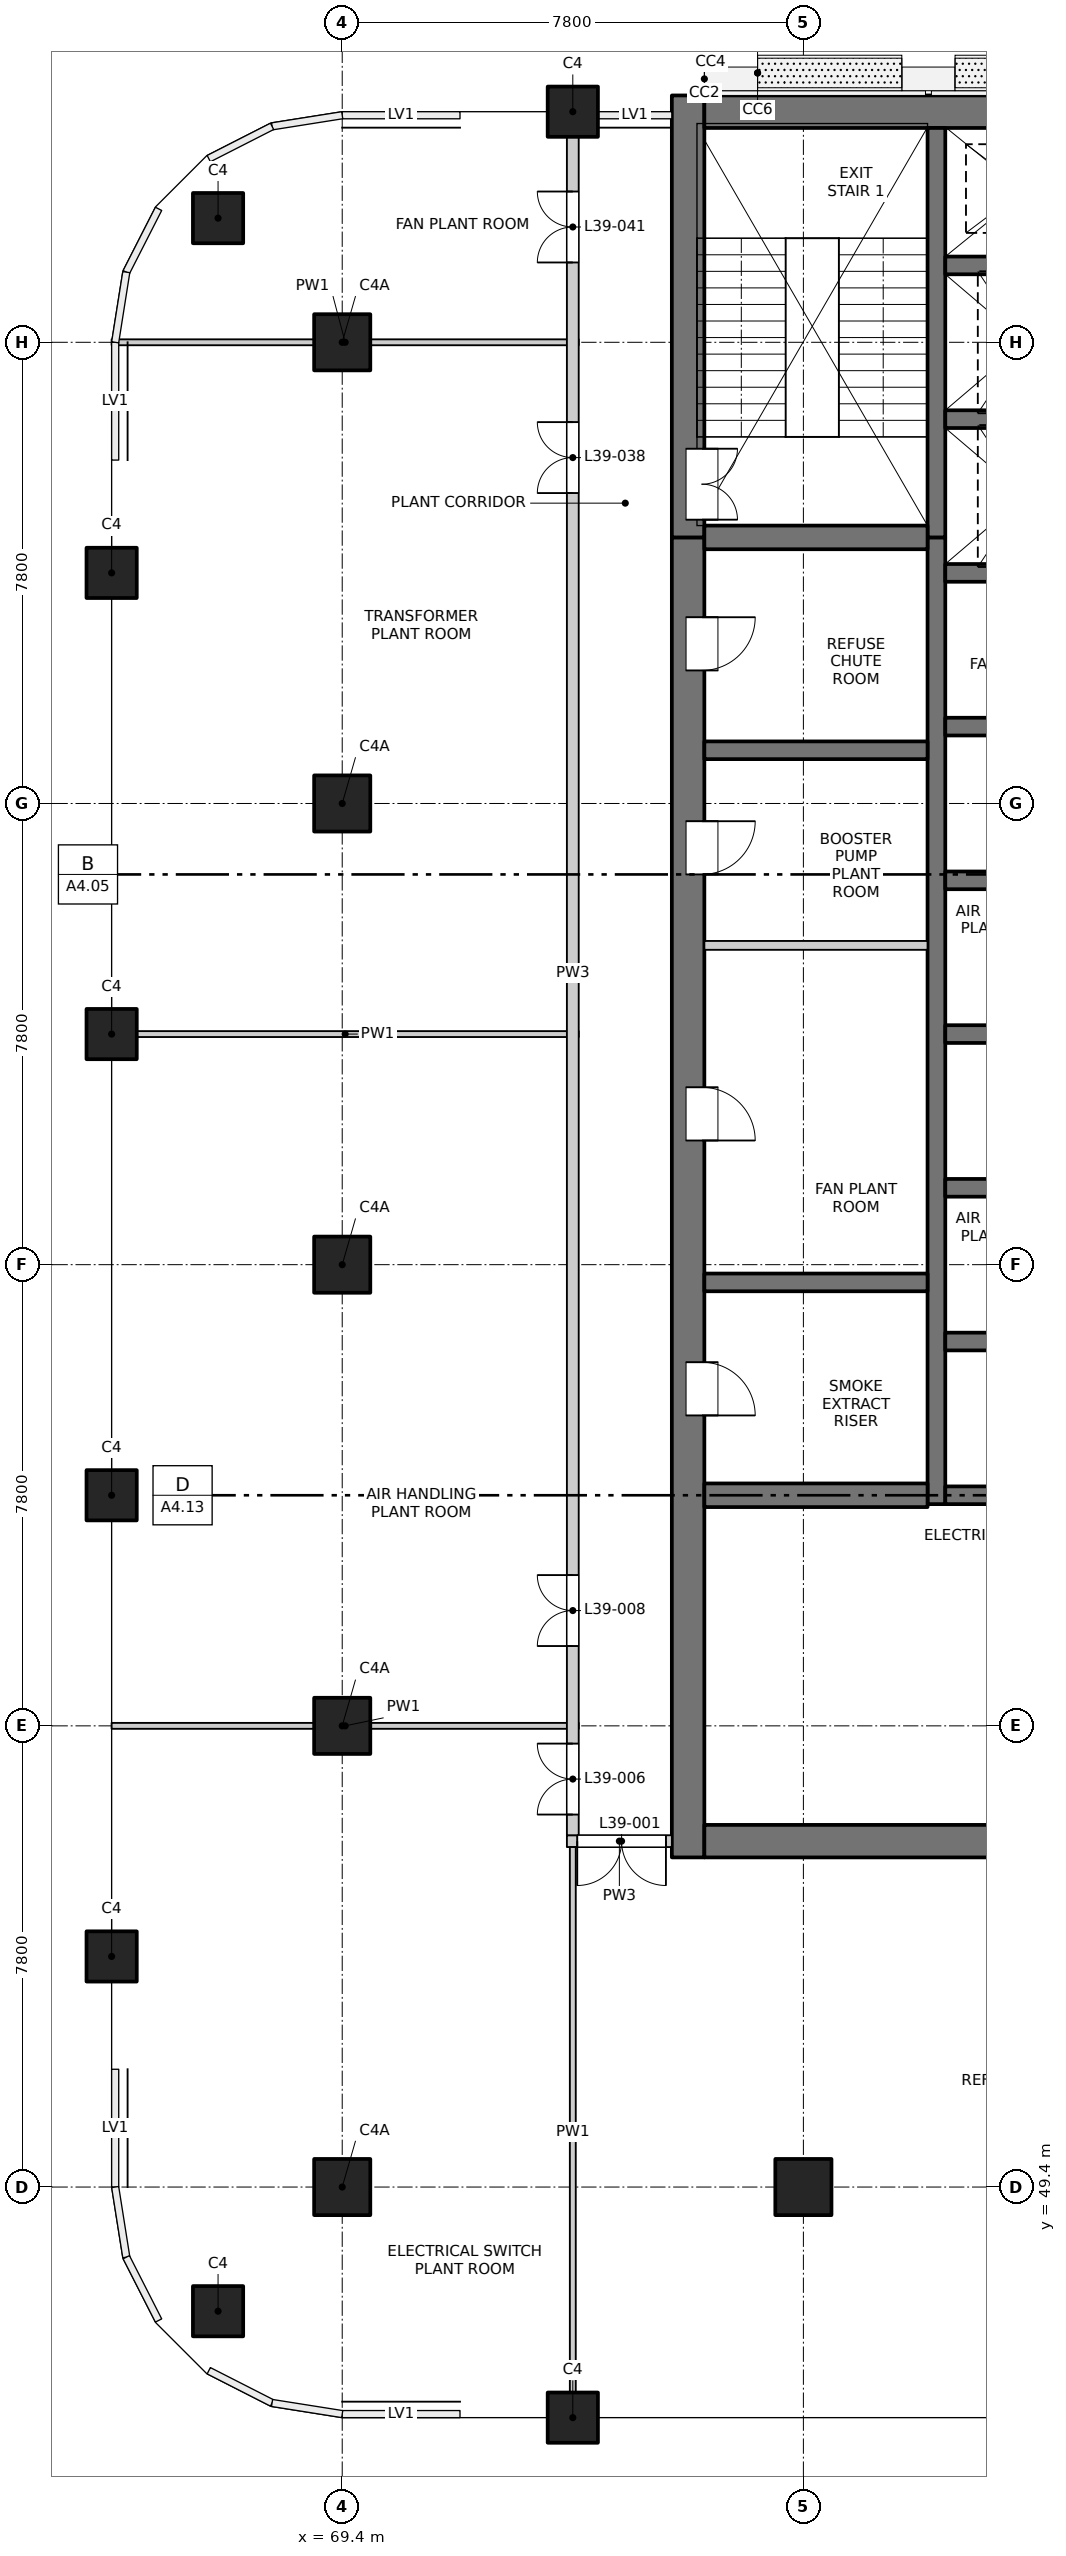
"""IFC4 building model, lengths in metres.
Left out: names, types, materials, properties, quantities, classifications, styles, units other than length and angle.
Written with IfcOpenShell. Run it as: python <this file> out.ifc"""

import sys

from ifc_helpers import new_model, si_unit, direction, frame, frame_2d, origin, origin_2d, place, context, subcontext, project, spatial, rectangle, extrude, element, fill, save


model = new_model("IFC4")
c1 = context("Model", 3, precision=1e-05, world=origin(), true_north=direction((0.0, 1.0)))
c2 = subcontext(c1, "Body", "Model", "MODEL_VIEW")
j1 = project(units=[si_unit("LENGTHUNIT", "METRE"), si_unit("PLANEANGLEUNIT", "RADIAN")], contexts=[c1])
p1 = place(None, origin())
s1 = spatial("IfcSite", under=j1, at=p1, CompositionType="ELEMENT")
p2 = place(p1, origin())
s2 = spatial("IfcBuilding", under=s1, at=p2, CompositionType="ELEMENT")
p3 = place(p2, frame((0.0, 0.0, 144.1)))
s3 = spatial("IfcBuildingStorey", under=s2, at=p3, CompositionType="ELEMENT", Elevation=144.1)
for number, where, z_axis, x_axis in (
    (1, (67.3, 47.3, -0.3), (0.0, 0.0, 1.0), (1.0, 0.0, 0.0)),
    (2, (67.3, 82.7, -0.3), (0.0, 0.0, 1.0), (1.0, 0.0, 0.0)),
    (3, (65.5, 53.3, -0.3), (0.0, 0.0, 1.0), (1.0, 0.0, 0.0)),
    (4, (73.3, 45.5, -0.3), (0.0, 0.0, 1.0), (1.0, 0.0, 0.0)),
    (5, (73.3, 84.5, -0.3), (0.0, 0.0, 1.0), (1.0, 0.0, 0.0)),
    (6, (65.5, 61.1, -0.3), (0.0, 0.0, 1.0), (1.0, 0.0, 0.0)),
    (7, (65.5, 68.9, -0.3), (0.0, 0.0, 1.0), (1.0, 0.0, 0.0)),
    (8, (65.5, 76.7, -0.3), (0.0, 0.0, 1.0), (1.0, 0.0, 0.0)),
):
    element("IfcColumn", number, at=place(p3, frame(where, z_axis=z_axis, x_axis=x_axis)), inside=s3, PredefinedType="COLUMN", context=c2, shape_type="SweptSolid", body=[
        extrude(rectangle(XDim=0.85, YDim=0.85, at=origin_2d()), origin(), (0.0, 0.0, 1.0), 4.5),
    ])
for number, where, z_axis, x_axis in (
    (9, (69.4, 49.4, -0.3), (0.0, 0.0, 1.0), (1.0, 0.0, 0.0)),
    (10, (69.4, 57.2, -0.3), (0.0, 0.0, 1.0), (1.0, 0.0, 0.0)),
    (11, (69.4, 65.0, -0.3), (0.0, 0.0, 1.0), (1.0, 0.0, 0.0)),
    (12, (69.4, 72.8, -0.3), (0.0, 0.0, 1.0), (1.0, 0.0, 0.0)),
    (13, (69.4, 80.6, -0.3), (0.0, 0.0, 1.0), (1.0, 0.0, 0.0)),
    (14, (77.2, 49.4, -0.3), (0.0, 0.0, 1.0), (1.0, 0.0, 0.0)),
):
    element("IfcColumn", number, at=place(p3, frame(where, z_axis=z_axis, x_axis=x_axis)), inside=s3, PredefinedType="COLUMN", context=c2, shape_type="SweptSolid", body=[
        extrude(rectangle(XDim=0.95, YDim=0.95, at=origin_2d()), origin(), (0.0, 0.0, 1.0), 4.5),
    ])
p4 = place(p3, frame((75.25, 54.975, -0.3), z_axis=(0.0, 0.0, 1.0), x_axis=(0.0, 1.0, 0.0)))
e15 = element("IfcWall", 15, at=p4, inside=s3, PredefinedType="SOLIDWALL", context=c2, shape_type="SweptSolid", body=[
    extrude(rectangle(XDim=22.325, YDim=0.55, at=frame_2d((11.163, 0.0))), origin(), (0.0, 0.0, 1.0), 4.5),
])
p5 = place(p4, frame((7.475, 0.0, 0.3)))
e16 = element("IfcOpeningElement", 16, at=p5, cuts=e15, PredefinedType="OPENING", context=c2, shape_type="SweptSolid", body=[
    extrude(rectangle(XDim=0.9, YDim=2.1, at=frame_2d((0.45, 1.05))), frame((0.0, 0.285, 0.0), z_axis=(0.0, -1.0, 0.0), x_axis=(1.0, 0.0, 0.0)), (0.0, 0.0, 1.0), 0.57),
])
p6 = place(p4, frame((12.125, 0.0, 0.3)))
e17 = element("IfcOpeningElement", 17, at=p6, cuts=e15, PredefinedType="OPENING", context=c2, shape_type="SweptSolid", body=[
    extrude(rectangle(XDim=0.9, YDim=2.1, at=frame_2d((0.45, 1.05))), frame((0.0, 0.285, 0.0), z_axis=(0.0, -1.0, 0.0), x_axis=(1.0, 0.0, 0.0)), (0.0, 0.0, 1.0), 0.57),
])
p7 = place(p4, frame((16.625, 0.0, 0.3)))
e18 = element("IfcOpeningElement", 18, at=p7, cuts=e15, PredefinedType="OPENING", context=c2, shape_type="SweptSolid", body=[
    extrude(rectangle(XDim=0.9, YDim=2.1, at=frame_2d((0.45, 1.05))), frame((0.0, 0.285, 0.0), z_axis=(0.0, -1.0, 0.0), x_axis=(1.0, 0.0, 0.0)), (0.0, 0.0, 1.0), 0.57),
])
p8 = place(p4, frame((20.075, 0.0, 0.3)))
e19 = element("IfcOpeningElement", 19, at=p8, cuts=e15, PredefinedType="OPENING", context=c2, shape_type="SweptSolid", body=[
    extrude(rectangle(XDim=0.9, YDim=2.1, at=frame_2d((0.45, 1.05))), frame((0.0, 0.285, 0.0), z_axis=(0.0, -1.0, 0.0), x_axis=(1.0, 0.0, 0.0)), (0.0, 0.0, 1.0), 0.57),
])
p9 = place(p3, frame((75.25, 77.3, -0.3), z_axis=(0.0, 0.0, 1.0), x_axis=(0.0, 1.0, 0.0)))
e20 = element("IfcWall", 20, at=p9, inside=s3, PredefinedType="SOLIDWALL", context=c2, shape_type="SweptSolid", body=[
    extrude(rectangle(XDim=7.475, YDim=0.55, at=frame_2d((3.737, 0.0))), origin(), (0.0, 0.0, 1.0), 4.5),
])
p10 = place(p9, frame((0.3, 0.0, 0.3)))
e21 = element("IfcOpeningElement", 21, at=p10, cuts=e20, PredefinedType="OPENING", context=c2, shape_type="SweptSolid", body=[
    extrude(rectangle(XDim=1.2, YDim=2.1, at=frame_2d((0.6, 1.05))), frame((0.0, 0.285, 0.0), z_axis=(0.0, -1.0, 0.0), x_axis=(1.0, 0.0, 0.0)), (0.0, 0.0, 1.0), 0.57),
])
p11 = place(p3, frame((75.525, 55.25, -0.3), z_axis=(0.0, 0.0, 1.0), x_axis=(1.0, 0.0, 0.0)))
e22 = element("IfcWall", 22, at=p11, inside=s3, PredefinedType="SOLIDWALL", context=c2, shape_type="SweptSolid", body=[
    extrude(rectangle(XDim=18.95, YDim=0.55, at=frame_2d((9.475, 0.0))), origin(), (0.0, 0.0, 1.0), 4.5),
])
p12 = place(p11, frame((7.225, 0.0, 0.3)))
e23 = element("IfcOpeningElement", 23, at=p12, cuts=e22, PredefinedType="OPENING", context=c2, shape_type="SweptSolid", body=[
    extrude(rectangle(XDim=1.5, YDim=2.1, at=frame_2d((0.75, 1.05))), frame((0.0, 0.285, 0.0), z_axis=(0.0, -1.0, 0.0), x_axis=(1.0, 0.0, 0.0)), (0.0, 0.0, 1.0), 0.57),
])
p13 = place(p3, frame((75.525, 84.5, -0.3), z_axis=(0.0, 0.0, 1.0), x_axis=(1.0, 0.0, 0.0)))
e24 = element("IfcWall", 24, at=p13, inside=s3, PredefinedType="SOLIDWALL", context=c2, shape_type="SweptSolid", body=[
    extrude(rectangle(XDim=18.95, YDim=0.55, at=frame_2d((9.475, 0.0))), origin(), (0.0, 0.0, 1.0), 4.5),
])
p14 = place(p3, frame((79.45, 60.95, -0.3), z_axis=(0.0, 0.0, 1.0), x_axis=(0.0, 1.0, 0.0)))
e25 = element("IfcWall", 25, at=p14, inside=s3, PredefinedType="SOLIDWALL", context=c2, shape_type="SweptSolid", body=[
    extrude(rectangle(XDim=16.35, YDim=0.3, at=frame_2d((8.175, 0.0))), origin(), (0.0, 0.0, 1.0), 4.5),
])
p15 = place(p3, frame((79.45, 77.3, -0.3), z_axis=(0.0, 0.0, 1.0), x_axis=(0.0, 1.0, 0.0)))
e26 = element("IfcWall", 26, at=p15, inside=s3, PredefinedType="SOLIDWALL", context=c2, shape_type="SweptSolid", body=[
    extrude(rectangle(XDim=6.925, YDim=0.3, at=frame_2d((3.462, 0.0))), origin(), (0.0, 0.0, 1.0), 4.5),
])
for number, where, z_axis, x_axis in (
    (27, (79.6, 61.1, -0.3), (0.0, 0.0, 1.0), (1.0, 0.0, 0.0)),
    (28, (79.6, 63.7, -0.3), (0.0, 0.0, 1.0), (1.0, 0.0, 0.0)),
    (29, (79.6, 66.3, -0.3), (0.0, 0.0, 1.0), (1.0, 0.0, 0.0)),
    (30, (79.6, 68.9, -0.3), (0.0, 0.0, 1.0), (1.0, 0.0, 0.0)),
    (31, (79.6, 71.5, -0.3), (0.0, 0.0, 1.0), (1.0, 0.0, 0.0)),
    (32, (79.6, 74.1, -0.3), (0.0, 0.0, 1.0), (1.0, 0.0, 0.0)),
    (33, (79.6, 76.7, -0.3), (0.0, 0.0, 1.0), (1.0, 0.0, 0.0)),
    (34, (79.6, 79.3, -0.3), (0.0, 0.0, 1.0), (1.0, 0.0, 0.0)),
    (35, (79.6, 81.9, -0.3), (0.0, 0.0, 1.0), (1.0, 0.0, 0.0)),
):
    element("IfcWall", number, at=place(p3, frame(where, z_axis=z_axis, x_axis=x_axis)), inside=s3, PredefinedType="SOLIDWALL", context=c2, shape_type="SweptSolid", body=[
        extrude(rectangle(XDim=3.0, YDim=0.3, at=frame_2d((1.5, 0.0))), origin(), (0.0, 0.0, 1.0), 4.5),
    ])
p16 = place(p3, frame((75.525, 61.1, -0.3), z_axis=(0.0, 0.0, 1.0), x_axis=(1.0, 0.0, 0.0)))
e36 = element("IfcWall", 36, at=p16, inside=s3, PredefinedType="SOLIDWALL", context=c2, shape_type="SweptSolid", body=[
    extrude(rectangle(XDim=3.775, YDim=0.4, at=frame_2d((1.888, 0.0))), origin(), (0.0, 0.0, 1.0), 4.5),
])
for number, where, z_axis, x_axis in (
    (37, (75.525, 64.7, -0.3), (0.0, 0.0, 1.0), (1.0, 0.0, 0.0)),
    (38, (75.525, 73.7, -0.3), (0.0, 0.0, 1.0), (1.0, 0.0, 0.0)),
):
    element("IfcWall", number, at=place(p3, frame(where, z_axis=z_axis, x_axis=x_axis)), inside=s3, PredefinedType="SOLIDWALL", context=c2, shape_type="SweptSolid", body=[
        extrude(rectangle(XDim=3.775, YDim=0.3, at=frame_2d((1.888, 0.0))), origin(), (0.0, 0.0, 1.0), 4.5),
    ])
p17 = place(p3, frame((75.525, 77.3, -0.3), z_axis=(0.0, 0.0, 1.0), x_axis=(1.0, 0.0, 0.0)))
e39 = element("IfcWall", 39, at=p17, inside=s3, PredefinedType="SOLIDWALL", context=c2, shape_type="SweptSolid", body=[
    extrude(rectangle(XDim=3.775, YDim=0.4, at=frame_2d((1.888, 0.0))), origin(), (0.0, 0.0, 1.0), 4.5),
])
p18 = place(p3, frame((73.2, 55.25, 0.0), z_axis=(0.0, 0.0, 1.0), x_axis=(1.0, 0.0, 0.0)))
e40 = element("IfcWall", 40, at=p18, inside=s3, PredefinedType="PARTITIONING", context=c2, shape_type="SweptSolid", body=[
    extrude(rectangle(XDim=1.775, YDim=0.2, at=frame_2d((0.887, 0.0))), origin(), (0.0, 0.0, 1.0), 4.2),
])
p19 = place(p18, frame((0.175, 0.0, 0.0)))
e41 = element("IfcOpeningElement", 41, at=p19, cuts=e40, PredefinedType="OPENING", context=c2, shape_type="SweptSolid", body=[
    extrude(rectangle(XDim=1.5, YDim=2.1, at=frame_2d((0.75, 1.05))), frame((0.0, 0.11, 0.0), z_axis=(0.0, -1.0, 0.0), x_axis=(1.0, 0.0, 0.0)), (0.0, 0.0, 1.0), 0.22),
])
p20 = place(p3, frame((65.5, 57.2, 0.0), z_axis=(0.0, 0.0, 1.0), x_axis=(1.0, 0.0, 0.0)))
e42 = element("IfcWall", 42, at=p20, inside=s3, PredefinedType="PARTITIONING", context=c2, shape_type="SweptSolid", body=[
    extrude(rectangle(XDim=7.9, YDim=0.1, at=frame_2d((3.95, 0.0))), origin(), (0.0, 0.0, 1.0), 4.2),
])
p21 = place(p3, frame((65.5, 68.9, 0.0), z_axis=(0.0, 0.0, 1.0), x_axis=(1.0, 0.0, 0.0)))
e43 = element("IfcWall", 43, at=p21, inside=s3, PredefinedType="PARTITIONING", context=c2, shape_type="SweptSolid", body=[
    extrude(rectangle(XDim=7.9, YDim=0.1, at=frame_2d((3.95, 0.0))), origin(), (0.0, 0.0, 1.0), 3.6),
])
p22 = place(p3, frame((75.525, 70.4, 0.0), z_axis=(0.0, 0.0, 1.0), x_axis=(1.0, 0.0, 0.0)))
e44 = element("IfcWall", 44, at=p22, inside=s3, PredefinedType="PARTITIONING", context=c2, shape_type="SweptSolid", body=[
    extrude(rectangle(XDim=3.775, YDim=0.15, at=frame_2d((1.887, 0.0))), origin(), (0.0, 0.0, 1.0), 4.2),
])
p23 = place(p3, frame((65.5, 80.6, 0.0), z_axis=(0.0, 0.0, 1.0), x_axis=(1.0, 0.0, 0.0)))
e45 = element("IfcWall", 45, at=p23, inside=s3, PredefinedType="PARTITIONING", context=c2, shape_type="SweptSolid", body=[
    extrude(rectangle(XDim=7.9, YDim=0.1, at=frame_2d((3.95, 0.0))), origin(), (0.0, 0.0, 1.0), 4.2),
])
p24 = place(p3, frame((73.3, 45.5, 0.0), z_axis=(0.0, 0.0, 1.0), x_axis=(0.0, 1.0, 0.0)))
e46 = element("IfcWall", 46, at=p24, inside=s3, PredefinedType="PARTITIONING", context=c2, shape_type="SweptSolid", body=[
    extrude(rectangle(XDim=9.65, YDim=0.1, at=frame_2d((4.825, 0.0))), origin(), (0.0, 0.0, 1.0), 4.2),
])
p25 = place(p3, frame((73.3, 55.35, 0.0), z_axis=(0.0, 0.0, 1.0), x_axis=(0.0, 1.0, 0.0)))
e47 = element("IfcWall", 47, at=p25, inside=s3, PredefinedType="PARTITIONING", context=c2, shape_type="SweptSolid", body=[
    extrude(rectangle(XDim=29.15, YDim=0.2, at=frame_2d((14.575, 0.0))), origin(), (0.0, 0.0, 1.0), 4.2),
])
p26 = place(p25, frame((0.35, 0.0, 0.0)))
e48 = element("IfcOpeningElement", 48, at=p26, cuts=e47, PredefinedType="OPENING", context=c2, shape_type="SweptSolid", body=[
    extrude(rectangle(XDim=1.2, YDim=2.1, at=frame_2d((0.6, 1.05))), frame((0.0, 0.11, 0.0), z_axis=(0.0, -1.0, 0.0), x_axis=(1.0, 0.0, 0.0)), (0.0, 0.0, 1.0), 0.22),
])
p27 = place(p25, frame((3.2, 0.0, 0.0)))
e49 = element("IfcOpeningElement", 49, at=p27, cuts=e47, PredefinedType="OPENING", context=c2, shape_type="SweptSolid", body=[
    extrude(rectangle(XDim=1.2, YDim=2.1, at=frame_2d((0.6, 1.05))), frame((0.0, 0.11, 0.0), z_axis=(0.0, -1.0, 0.0), x_axis=(1.0, 0.0, 0.0)), (0.0, 0.0, 1.0), 0.22),
])
p28 = place(p25, frame((22.7, 0.0, 0.0)))
e50 = element("IfcOpeningElement", 50, at=p28, cuts=e47, PredefinedType="OPENING", context=c2, shape_type="SweptSolid", body=[
    extrude(rectangle(XDim=1.2, YDim=2.1, at=frame_2d((0.6, 1.05))), frame((0.0, 0.11, 0.0), z_axis=(0.0, -1.0, 0.0), x_axis=(1.0, 0.0, 0.0)), (0.0, 0.0, 1.0), 0.22),
])
p29 = place(p25, frame((26.6, 0.0, 0.0)))
e51 = element("IfcOpeningElement", 51, at=p29, cuts=e47, PredefinedType="OPENING", context=c2, shape_type="SweptSolid", body=[
    extrude(rectangle(XDim=1.2, YDim=2.1, at=frame_2d((0.6, 1.05))), frame((0.0, 0.11, 0.0), z_axis=(0.0, -1.0, 0.0), x_axis=(1.0, 0.0, 0.0)), (0.0, 0.0, 1.0), 0.22),
])
p30 = place(p19, origin())
e52 = element("IfcDoor", 52, at=p30, inside=s3, OperationType="DOUBLE_DOOR_SINGLE_SWING", PredefinedType="DOOR", context=c2, shape_type="SweptSolid", body=[
    extrude(rectangle(XDim=1.5, YDim=2.1, at=frame_2d((0.75, 1.05))), frame((0.0, 0.025, 0.0), z_axis=(0.0, -1.0, 0.0), x_axis=(1.0, 0.0, 0.0)), (0.0, 0.0, 1.0), 0.05),
])
fill(e41, e52)
p31 = place(p26, origin())
e53 = element("IfcDoor", 53, at=p31, inside=s3, OperationType="DOUBLE_DOOR_SINGLE_SWING", PredefinedType="DOOR", context=c2, shape_type="SweptSolid", body=[
    extrude(rectangle(XDim=1.2, YDim=2.1, at=frame_2d((0.6, 1.05))), frame((0.0, 0.025, 0.0), z_axis=(0.0, -1.0, 0.0), x_axis=(1.0, 0.0, 0.0)), (0.0, 0.0, 1.0), 0.05),
])
fill(e48, e53)
p32 = place(p27, origin())
e54 = element("IfcDoor", 54, at=p32, inside=s3, OperationType="DOUBLE_DOOR_SINGLE_SWING", PredefinedType="DOOR", context=c2, shape_type="SweptSolid", body=[
    extrude(rectangle(XDim=1.2, YDim=2.1, at=frame_2d((0.6, 1.05))), frame((0.0, 0.025, 0.0), z_axis=(0.0, -1.0, 0.0), x_axis=(1.0, 0.0, 0.0)), (0.0, 0.0, 1.0), 0.05),
])
fill(e49, e54)
p33 = place(p5, origin())
e55 = element("IfcDoor", 55, at=p33, inside=s3, OperationType="SINGLE_SWING_RIGHT", PredefinedType="DOOR", context=c2, shape_type="SweptSolid", body=[
    extrude(rectangle(XDim=0.9, YDim=2.1, at=frame_2d((0.45, 1.05))), frame((0.0, -0.21, 0.0), z_axis=(0.0, -1.0, 0.0), x_axis=(1.0, 0.0, 0.0)), (0.0, 0.0, 1.0), 0.05),
])
fill(e16, e55)
p34 = place(p6, origin())
e56 = element("IfcDoor", 56, at=p34, inside=s3, OperationType="SINGLE_SWING_RIGHT", PredefinedType="DOOR", context=c2, shape_type="SweptSolid", body=[
    extrude(rectangle(XDim=0.9, YDim=2.1, at=frame_2d((0.45, 1.05))), frame((0.0, -0.21, 0.0), z_axis=(0.0, -1.0, 0.0), x_axis=(1.0, 0.0, 0.0)), (0.0, 0.0, 1.0), 0.05),
])
fill(e17, e56)
p35 = place(p7, origin())
e57 = element("IfcDoor", 57, at=p35, inside=s3, OperationType="SINGLE_SWING_LEFT", PredefinedType="DOOR", context=c2, shape_type="SweptSolid", body=[
    extrude(rectangle(XDim=0.9, YDim=2.1, at=frame_2d((0.45, 1.05))), frame((0.0, -0.21, 0.0), z_axis=(0.0, -1.0, 0.0), x_axis=(1.0, 0.0, 0.0)), (0.0, 0.0, 1.0), 0.05),
])
fill(e18, e57)
p36 = place(p8, origin())
e58 = element("IfcDoor", 58, at=p36, inside=s3, OperationType="SINGLE_SWING_LEFT", PredefinedType="DOOR", context=c2, shape_type="SweptSolid", body=[
    extrude(rectangle(XDim=0.9, YDim=2.1, at=frame_2d((0.45, 1.05))), frame((0.0, -0.21, 0.0), z_axis=(0.0, -1.0, 0.0), x_axis=(1.0, 0.0, 0.0)), (0.0, 0.0, 1.0), 0.05),
])
fill(e19, e58)
p37 = place(p10, origin())
e59 = element("IfcDoor", 59, at=p37, inside=s3, OperationType="DOUBLE_DOOR_SINGLE_SWING", PredefinedType="DOOR", context=c2, shape_type="SweptSolid", body=[
    extrude(rectangle(XDim=1.2, YDim=2.1, at=frame_2d((0.6, 1.05))), frame((0.0, -0.21, 0.0), z_axis=(0.0, -1.0, 0.0), x_axis=(1.0, 0.0, 0.0)), (0.0, 0.0, 1.0), 0.05),
])
fill(e21, e59)
p38 = place(p28, origin())
e60 = element("IfcDoor", 60, at=p38, inside=s3, OperationType="DOUBLE_DOOR_SINGLE_SWING", PredefinedType="DOOR", context=c2, shape_type="SweptSolid", body=[
    extrude(rectangle(XDim=1.2, YDim=2.1, at=frame_2d((0.6, 1.05))), frame((0.0, 0.025, 0.0), z_axis=(0.0, -1.0, 0.0), x_axis=(1.0, 0.0, 0.0)), (0.0, 0.0, 1.0), 0.05),
])
fill(e50, e60)
p39 = place(p29, origin())
e61 = element("IfcDoor", 61, at=p39, inside=s3, OperationType="DOUBLE_DOOR_SINGLE_SWING", PredefinedType="DOOR", context=c2, shape_type="SweptSolid", body=[
    extrude(rectangle(XDim=1.2, YDim=2.1, at=frame_2d((0.6, 1.05))), frame((0.0, 0.025, 0.0), z_axis=(0.0, -1.0, 0.0), x_axis=(1.0, 0.0, 0.0)), (0.0, 0.0, 1.0), 0.05),
])
fill(e51, e61)
save(model, sys.argv[1])
